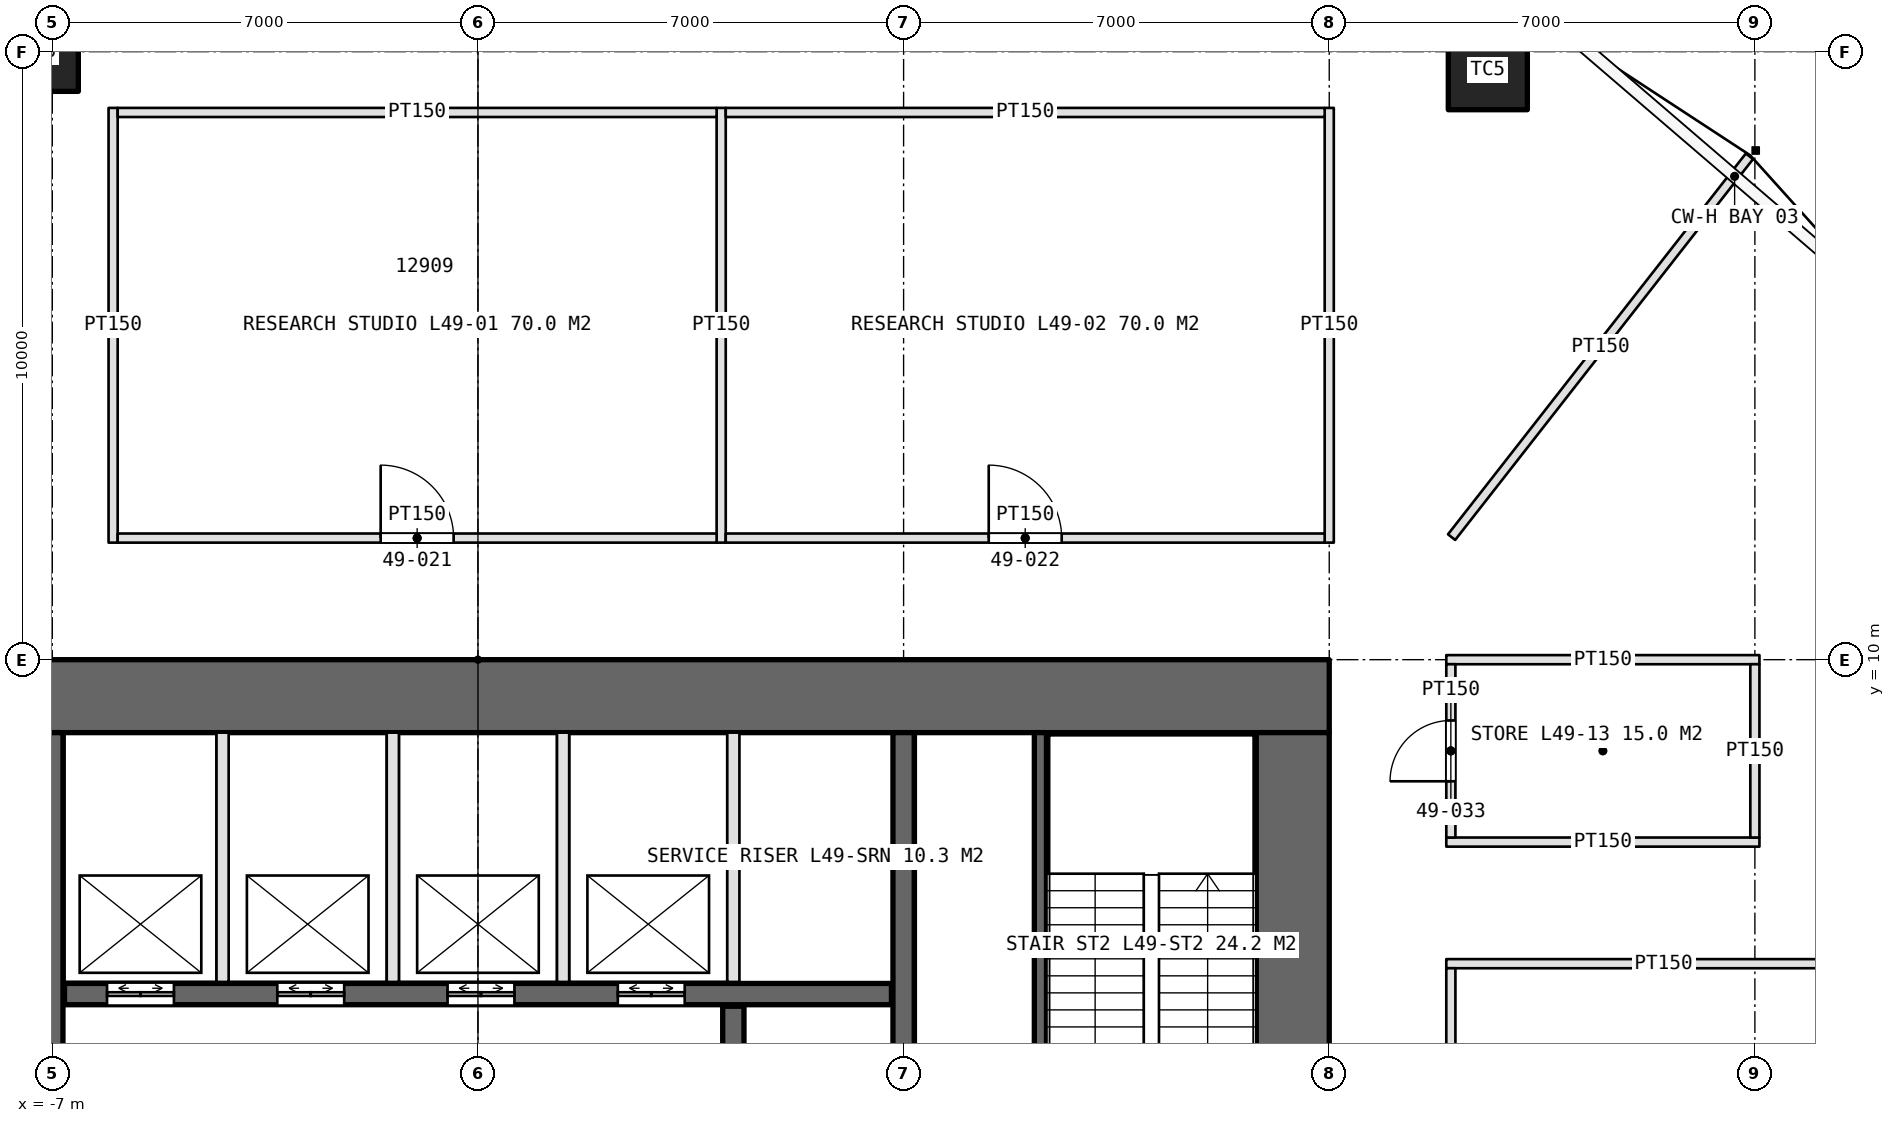
"""IFC4 building model, lengths in metres.
Left out: names, types, materials, properties, quantities, classifications, styles, units other than length and angle.
Written with IfcOpenShell. Run it as: python <this file> out.ifc"""

import sys

from ifc_helpers import new_model, si_unit, direction, frame, frame_2d, origin, origin_2d, place, context, subcontext, project, spatial, rectangle, extrude, element, fill, save


model = new_model("IFC4")
c1 = context("Model", 3, precision=1e-05, world=origin(), true_north=direction((0.0, 1.0)))
c2 = subcontext(c1, "Body", "Model", "MODEL_VIEW")
j1 = project(units=[si_unit("LENGTHUNIT", "METRE"), si_unit("PLANEANGLEUNIT", "RADIAN")], contexts=[c1])
p1 = place(None, origin())
s1 = spatial("IfcSite", under=j1, at=p1, CompositionType="ELEMENT")
p2 = place(p1, origin())
s2 = spatial("IfcBuilding", under=s1, at=p2, CompositionType="ELEMENT")
p3 = place(p2, frame((0.0, 0.0, 224.2)))
s3 = spatial("IfcBuildingStorey", under=s2, at=p3, CompositionType="ELEMENT", Elevation=224.2)
p4 = place(p3, frame((14.0, 9.4, 0.0), z_axis=(0.0, 0.0, 1.0), x_axis=(-1.0, 0.0, 0.0)))
e1 = element("IfcWall", 1, at=p4, inside=s3, PredefinedType="SHEAR", context=c2, shape_type="SweptSolid", body=[
    extrude(rectangle(XDim=28.0, YDim=1.2, at=frame_2d((14.0, 0.0))), origin(), (0.0, 0.0, 1.0), 4.2),
])
p5 = place(p4, frame((24.0, 0.0, 0.0)))
e2 = element("IfcOpeningElement", 2, at=p5, cuts=e1, PredefinedType="OPENING", context=c2, shape_type="SweptSolid", body=[
    extrude(rectangle(XDim=1.0, YDim=2.4, at=frame_2d((0.5, 1.2))), frame((0.0, 0.61, 0.0), z_axis=(0.0, -1.0, 0.0), x_axis=(1.0, 0.0, 0.0)), (0.0, 0.0, 1.0), 1.22),
])
p6 = place(p3, frame((13.4, -8.8, 0.0), z_axis=(0.0, 0.0, 1.0), x_axis=(0.0, 1.0, 0.0)))
e3 = element("IfcWall", 3, at=p6, inside=s3, PredefinedType="SHEAR", context=c2, shape_type="SweptSolid", body=[
    extrude(rectangle(XDim=17.6, YDim=1.2, at=frame_2d((8.8, 0.0))), origin(), (0.0, 0.0, 1.0), 4.2),
])
p7 = place(p6, frame((7.9, 0.0, 0.0)))
e4 = element("IfcOpeningElement", 4, at=p7, cuts=e3, PredefinedType="OPENING", context=c2, shape_type="SweptSolid", body=[
    extrude(rectangle(XDim=1.8, YDim=2.4, at=frame_2d((0.9, 1.2))), frame((0.0, 0.61, 0.0), z_axis=(0.0, -1.0, 0.0), x_axis=(1.0, 0.0, 0.0)), (0.0, 0.0, 1.0), 1.22),
])
p8 = place(p3, frame((-7.0, -8.8, 0.0), z_axis=(0.0, 0.0, 1.0), x_axis=(0.0, 1.0, 0.0)))
e5 = element("IfcWall", 5, at=p8, inside=s3, PredefinedType="SHEAR", context=c2, shape_type="SweptSolid", body=[
    extrude(rectangle(XDim=17.6, YDim=0.35, at=frame_2d((8.8, 0.0))), origin(), (0.0, 0.0, 1.0), 4.2),
])
p9 = place(p8, frame((7.9, 0.0, 0.0)))
e6 = element("IfcOpeningElement", 6, at=p9, cuts=e5, PredefinedType="OPENING", context=c2, shape_type="SweptSolid", body=[
    extrude(rectangle(XDim=1.8, YDim=2.4, at=frame_2d((0.9, 1.2))), frame((0.0, 0.185, 0.0), z_axis=(0.0, -1.0, 0.0), x_axis=(1.0, 0.0, 0.0)), (0.0, 0.0, 1.0), 0.37),
])
p10 = place(p3, frame((7.0, -8.8, 0.0), z_axis=(0.0, 0.0, 1.0), x_axis=(0.0, 1.0, 0.0)))
e7 = element("IfcWall", 7, at=p10, inside=s3, PredefinedType="SHEAR", context=c2, shape_type="SweptSolid", body=[
    extrude(rectangle(XDim=17.6, YDim=0.35, at=frame_2d((8.8, 0.0))), origin(), (0.0, 0.0, 1.0), 4.2),
])
p11 = place(p10, frame((7.9, 0.0, 0.0)))
e8 = element("IfcOpeningElement", 8, at=p11, cuts=e7, PredefinedType="OPENING", context=c2, shape_type="SweptSolid", body=[
    extrude(rectangle(XDim=1.8, YDim=2.4, at=frame_2d((0.9, 1.2))), frame((0.0, 0.185, 0.0), z_axis=(0.0, -1.0, 0.0), x_axis=(1.0, 0.0, 0.0)), (0.0, 0.0, 1.0), 0.37),
])
p12 = place(p3, frame((-6.8, 4.5, 0.0), z_axis=(0.0, 0.0, 1.0), x_axis=(1.0, 0.0, 0.0)))
e9 = element("IfcWall", 9, at=p12, inside=s3, PredefinedType="SHEAR", context=c2, shape_type="SweptSolid", body=[
    extrude(rectangle(XDim=13.6, YDim=0.35, at=frame_2d((6.8, 0.0))), origin(), (0.0, 0.0, 1.0), 4.2),
])
p13 = place(p12, frame((0.7, 0.0, 0.0)))
e10 = element("IfcOpeningElement", 10, at=p13, cuts=e9, PredefinedType="OPENING", context=c2, shape_type="SweptSolid", body=[
    extrude(rectangle(XDim=1.1, YDim=2.4, at=frame_2d((0.55, 1.2))), frame((0.0, 0.185, 0.0), z_axis=(0.0, -1.0, 0.0), x_axis=(1.0, 0.0, 0.0)), (0.0, 0.0, 1.0), 0.37),
])
p14 = place(p12, frame((3.5, 0.0, 0.0)))
e11 = element("IfcOpeningElement", 11, at=p14, cuts=e9, PredefinedType="OPENING", context=c2, shape_type="SweptSolid", body=[
    extrude(rectangle(XDim=1.1, YDim=2.4, at=frame_2d((0.55, 1.2))), frame((0.0, 0.185, 0.0), z_axis=(0.0, -1.0, 0.0), x_axis=(1.0, 0.0, 0.0)), (0.0, 0.0, 1.0), 0.37),
])
p15 = place(p12, frame((6.3, 0.0, 0.0)))
e12 = element("IfcOpeningElement", 12, at=p15, cuts=e9, PredefinedType="OPENING", context=c2, shape_type="SweptSolid", body=[
    extrude(rectangle(XDim=1.1, YDim=2.4, at=frame_2d((0.55, 1.2))), frame((0.0, 0.185, 0.0), z_axis=(0.0, -1.0, 0.0), x_axis=(1.0, 0.0, 0.0)), (0.0, 0.0, 1.0), 0.37),
])
p16 = place(p12, frame((9.1, 0.0, 0.0)))
e13 = element("IfcOpeningElement", 13, at=p16, cuts=e9, PredefinedType="OPENING", context=c2, shape_type="SweptSolid", body=[
    extrude(rectangle(XDim=1.1, YDim=2.4, at=frame_2d((0.55, 1.2))), frame((0.0, 0.185, 0.0), z_axis=(0.0, -1.0, 0.0), x_axis=(1.0, 0.0, 0.0)), (0.0, 0.0, 1.0), 0.37),
])
p17 = place(p3, frame((4.2, 1.8, 0.0), z_axis=(0.0, 0.0, 1.0), x_axis=(0.0, 1.0, 0.0)))
e14 = element("IfcWall", 14, at=p17, inside=s3, PredefinedType="SHEAR", context=c2, shape_type="SweptSolid", body=[
    extrude(rectangle(XDim=2.5, YDim=0.35, at=frame_2d((1.25, 0.0))), origin(), (0.0, 0.0, 1.0), 4.2),
])
for number, where, z_axis, x_axis in (
    (15, (16.608, 19.695, 0.0), (0.0, 0.0, 1.0), (1.0, 0.0, 0.0)),
    (16, (-7.222, 19.997, 0.0), (0.0, 0.0, 1.0), (1.0, 0.0, 0.0)),
):
    element("IfcColumn", number, at=place(p3, frame(where, z_axis=z_axis, x_axis=x_axis)), inside=s3, PredefinedType="COLUMN", context=c2, shape_type="SweptSolid", body=[
        extrude(rectangle(XDim=1.3, YDim=1.3, at=origin_2d()), origin(), (0.0, 0.0, 1.0), 4.2),
    ])
for number, where, z_axis, x_axis in (
    (17, (-4.2, 4.7, 0.0), (0.0, 0.0, 1.0), (0.0, 1.0, 0.0)),
    (18, (-1.4, 4.7, 0.0), (0.0, 0.0, 1.0), (0.0, 1.0, 0.0)),
    (19, (1.4, 4.7, 0.0), (0.0, 0.0, 1.0), (0.0, 1.0, 0.0)),
    (20, (4.2, 4.7, 0.0), (0.0, 0.0, 1.0), (0.0, 1.0, 0.0)),
):
    element("IfcWall", number, at=place(p3, frame(where, z_axis=z_axis, x_axis=x_axis)), inside=s3, PredefinedType="PARTITIONING", context=c2, shape_type="SweptSolid", body=[
        extrude(rectangle(XDim=4.1, YDim=0.2, at=frame_2d((2.05, 0.0))), origin(), (0.0, 0.0, 1.0), 4.2),
    ])
p18 = place(p3, frame((9.25, 3.4, 0.0), z_axis=(0.0, 0.0, 1.0), x_axis=(0.0, 1.0, 0.0)))
e21 = element("IfcWall", 21, at=p18, inside=s3, PredefinedType="SOLIDWALL", context=c2, shape_type="SweptSolid", body=[
    extrude(rectangle(XDim=5.4, YDim=0.2, at=frame_2d((2.7, 0.0))), origin(), (0.0, 0.0, 1.0), 4.2),
])
for number, where, z_axis, x_axis in (
    (22, (-6.0, 11.925, 0.0), (0.0, 0.0, 1.0), (0.0, 1.0, 0.0)),
    (23, (4.0, 11.925, 0.0), (0.0, 0.0, 1.0), (0.0, 1.0, 0.0)),
    (24, (14.0, 11.925, 0.0), (0.0, 0.0, 1.0), (0.0, 1.0, 0.0)),
):
    element("IfcWall", number, at=place(p3, frame(where, z_axis=z_axis, x_axis=x_axis)), inside=s3, PredefinedType="PARTITIONING", context=c2, shape_type="SweptSolid", body=[
        extrude(rectangle(XDim=7.15, YDim=0.15, at=frame_2d((3.575, 0.0))), origin(), (0.0, 0.0, 1.0), 3.0),
    ])
p19 = place(p3, frame((-5.925, 12.0, 0.0), z_axis=(0.0, 0.0, 1.0), x_axis=(1.0, 0.0, 0.0)))
e25 = element("IfcWall", 25, at=p19, inside=s3, PredefinedType="PARTITIONING", context=c2, shape_type="SweptSolid", body=[
    extrude(rectangle(XDim=9.85, YDim=0.15, at=frame_2d((4.925, 0.0))), origin(), (0.0, 0.0, 1.0), 3.0),
])
p20 = place(p19, frame((4.325, 0.0, 0.0)))
e26 = element("IfcOpeningElement", 26, at=p20, cuts=e25, PredefinedType="OPENING", context=c2, shape_type="SweptSolid", body=[
    extrude(rectangle(XDim=1.2, YDim=2.4, at=frame_2d((0.6, 1.2))), frame((0.0, 0.085, 0.0), z_axis=(0.0, -1.0, 0.0), x_axis=(1.0, 0.0, 0.0)), (0.0, 0.0, 1.0), 0.17),
])
p21 = place(p3, frame((-5.925, 19.0, 0.0), z_axis=(0.0, 0.0, 1.0), x_axis=(1.0, 0.0, 0.0)))
e27 = element("IfcWall", 27, at=p21, inside=s3, PredefinedType="PARTITIONING", context=c2, shape_type="SweptSolid", body=[
    extrude(rectangle(XDim=9.85, YDim=0.15, at=frame_2d((4.925, 0.0))), origin(), (0.0, 0.0, 1.0), 3.0),
])
p22 = place(p3, frame((4.075, 12.0, 0.0), z_axis=(0.0, 0.0, 1.0), x_axis=(1.0, 0.0, 0.0)))
e28 = element("IfcWall", 28, at=p22, inside=s3, PredefinedType="PARTITIONING", context=c2, shape_type="SweptSolid", body=[
    extrude(rectangle(XDim=9.85, YDim=0.15, at=frame_2d((4.925, 0.0))), origin(), (0.0, 0.0, 1.0), 3.0),
])
p23 = place(p22, frame((4.325, 0.0, 0.0)))
e29 = element("IfcOpeningElement", 29, at=p23, cuts=e28, PredefinedType="OPENING", context=c2, shape_type="SweptSolid", body=[
    extrude(rectangle(XDim=1.2, YDim=2.4, at=frame_2d((0.6, 1.2))), frame((0.0, 0.085, 0.0), z_axis=(0.0, -1.0, 0.0), x_axis=(1.0, 0.0, 0.0)), (0.0, 0.0, 1.0), 0.17),
])
p24 = place(p3, frame((4.075, 19.0, 0.0), z_axis=(0.0, 0.0, 1.0), x_axis=(1.0, 0.0, 0.0)))
e30 = element("IfcWall", 30, at=p24, inside=s3, PredefinedType="PARTITIONING", context=c2, shape_type="SweptSolid", body=[
    extrude(rectangle(XDim=9.85, YDim=0.15, at=frame_2d((4.925, 0.0))), origin(), (0.0, 0.0, 1.0), 3.0),
])
p25 = place(p3, frame((15.925, 5.0, 0.0), z_axis=(0.0, 0.0, 1.0), x_axis=(1.0, 0.0, 0.0)))
e31 = element("IfcWall", 31, at=p25, inside=s3, PredefinedType="PARTITIONING", context=c2, shape_type="SweptSolid", body=[
    extrude(rectangle(XDim=7.15, YDim=0.15, at=frame_2d((3.575, 0.0))), origin(), (0.0, 0.0, 1.0), 3.0),
])
p26 = place(p3, frame((16.0, -2.925, 0.0), z_axis=(0.0, 0.0, 1.0), x_axis=(0.0, 1.0, 0.0)))
e32 = element("IfcWall", 32, at=p26, inside=s3, PredefinedType="PARTITIONING", context=c2, shape_type="SweptSolid", body=[
    extrude(rectangle(XDim=7.85, YDim=0.15, at=frame_2d((3.925, 0.0))), origin(), (0.0, 0.0, 1.0), 3.0),
])
p27 = place(p26, frame((3.325, 0.0, 0.0)))
e33 = element("IfcOpeningElement", 33, at=p27, cuts=e32, PredefinedType="OPENING", context=c2, shape_type="SweptSolid", body=[
    extrude(rectangle(XDim=1.2, YDim=2.4, at=frame_2d((0.6, 1.2))), frame((0.0, 0.085, 0.0), z_axis=(0.0, -1.0, 0.0), x_axis=(1.0, 0.0, 0.0)), (0.0, 0.0, 1.0), 0.17),
])
for number, where, z_axis, x_axis in (
    (34, (15.925, 7.0, 0.0), (0.0, 0.0, 1.0), (1.0, 0.0, 0.0)),
    (35, (15.925, 10.0, 0.0), (0.0, 0.0, 1.0), (1.0, 0.0, 0.0)),
):
    element("IfcWall", number, at=place(p3, frame(where, z_axis=z_axis, x_axis=x_axis)), inside=s3, PredefinedType="PARTITIONING", context=c2, shape_type="SweptSolid", body=[
        extrude(rectangle(XDim=5.15, YDim=0.15, at=frame_2d((2.575, 0.0))), origin(), (0.0, 0.0, 1.0), 3.0),
    ])
p28 = place(p3, frame((16.0, 7.075, 0.0), z_axis=(0.0, 0.0, 1.0), x_axis=(0.0, 1.0, 0.0)))
e36 = element("IfcWall", 36, at=p28, inside=s3, PredefinedType="PARTITIONING", context=c2, shape_type="SweptSolid", body=[
    extrude(rectangle(XDim=2.85, YDim=0.15, at=frame_2d((1.425, 0.0))), origin(), (0.0, 0.0, 1.0), 3.0),
])
p29 = place(p28, frame((0.925, 0.0, 0.0)))
e37 = element("IfcOpeningElement", 37, at=p29, cuts=e36, PredefinedType="OPENING", context=c2, shape_type="SweptSolid", body=[
    extrude(rectangle(XDim=1.0, YDim=2.2, at=frame_2d((0.5, 1.1))), frame((0.0, 0.085, 0.0), z_axis=(0.0, -1.0, 0.0), x_axis=(1.0, 0.0, 0.0)), (0.0, 0.0, 1.0), 0.17),
])
p30 = place(p3, frame((21.0, 7.075, 0.0), z_axis=(0.0, 0.0, 1.0), x_axis=(0.0, 1.0, 0.0)))
e38 = element("IfcWall", 38, at=p30, inside=s3, PredefinedType="PARTITIONING", context=c2, shape_type="SweptSolid", body=[
    extrude(rectangle(XDim=2.85, YDim=0.15, at=frame_2d((1.425, 0.0))), origin(), (0.0, 0.0, 1.0), 3.0),
])
p31 = place(p3, frame((16.012, 12.016, 0.0), z_axis=(0.0, 0.0, 1.0), x_axis=(0.616030058222, 0.787722646219, 0.0)))
e39 = element("IfcWall", 39, at=p31, inside=s3, PredefinedType="PARTITIONING", context=c2, shape_type="SweptSolid", body=[
    extrude(rectangle(XDim=7.952, YDim=0.15, at=frame_2d((3.976, 0.0))), origin(), (0.0, 0.0, 1.0), 3.0),
])
p32 = place(p13, origin())
e40 = element("IfcDoor", 40, at=p32, inside=s3, OperationType="DOUBLE_DOOR_SLIDING", PredefinedType="DOOR", context=c2, shape_type="SweptSolid", body=[
    extrude(rectangle(XDim=1.1, YDim=2.4, at=frame_2d((0.55, 1.2))), frame((0.0, 0.025, 0.0), z_axis=(0.0, -1.0, 0.0), x_axis=(1.0, 0.0, 0.0)), (0.0, 0.0, 1.0), 0.05),
])
fill(e10, e40)
p33 = place(p14, origin())
e41 = element("IfcDoor", 41, at=p33, inside=s3, OperationType="DOUBLE_DOOR_SLIDING", PredefinedType="DOOR", context=c2, shape_type="SweptSolid", body=[
    extrude(rectangle(XDim=1.1, YDim=2.4, at=frame_2d((0.55, 1.2))), frame((0.0, 0.025, 0.0), z_axis=(0.0, -1.0, 0.0), x_axis=(1.0, 0.0, 0.0)), (0.0, 0.0, 1.0), 0.05),
])
fill(e11, e41)
p34 = place(p15, origin())
e42 = element("IfcDoor", 42, at=p34, inside=s3, OperationType="DOUBLE_DOOR_SLIDING", PredefinedType="DOOR", context=c2, shape_type="SweptSolid", body=[
    extrude(rectangle(XDim=1.1, YDim=2.4, at=frame_2d((0.55, 1.2))), frame((0.0, 0.025, 0.0), z_axis=(0.0, -1.0, 0.0), x_axis=(1.0, 0.0, 0.0)), (0.0, 0.0, 1.0), 0.05),
])
fill(e12, e42)
p35 = place(p16, origin())
e43 = element("IfcDoor", 43, at=p35, inside=s3, OperationType="DOUBLE_DOOR_SLIDING", PredefinedType="DOOR", context=c2, shape_type="SweptSolid", body=[
    extrude(rectangle(XDim=1.1, YDim=2.4, at=frame_2d((0.55, 1.2))), frame((0.0, 0.025, 0.0), z_axis=(0.0, -1.0, 0.0), x_axis=(1.0, 0.0, 0.0)), (0.0, 0.0, 1.0), 0.05),
])
fill(e13, e43)
p36 = place(p20, origin())
e44 = element("IfcDoor", 44, at=p36, inside=s3, OperationType="SINGLE_SWING_LEFT", PredefinedType="DOOR", context=c2, shape_type="SweptSolid", body=[
    extrude(rectangle(XDim=1.2, YDim=2.4, at=frame_2d((0.6, 1.2))), frame((0.0, 0.025, 0.0), z_axis=(0.0, -1.0, 0.0), x_axis=(1.0, 0.0, 0.0)), (0.0, 0.0, 1.0), 0.05),
])
fill(e26, e44)
p37 = place(p23, origin())
e45 = element("IfcDoor", 45, at=p37, inside=s3, OperationType="SINGLE_SWING_LEFT", PredefinedType="DOOR", context=c2, shape_type="SweptSolid", body=[
    extrude(rectangle(XDim=1.2, YDim=2.4, at=frame_2d((0.6, 1.2))), frame((0.0, 0.025, 0.0), z_axis=(0.0, -1.0, 0.0), x_axis=(1.0, 0.0, 0.0)), (0.0, 0.0, 1.0), 0.05),
])
fill(e29, e45)
p38 = place(p29, origin())
e46 = element("IfcDoor", 46, at=p38, inside=s3, OperationType="SINGLE_SWING_LEFT", PredefinedType="DOOR", context=c2, shape_type="SweptSolid", body=[
    extrude(rectangle(XDim=1.0, YDim=2.2, at=frame_2d((0.5, 1.1))), frame((0.0, 0.025, 0.0), z_axis=(0.0, -1.0, 0.0), x_axis=(1.0, 0.0, 0.0)), (0.0, 0.0, 1.0), 0.05),
])
fill(e37, e46)
save(model, sys.argv[1])
